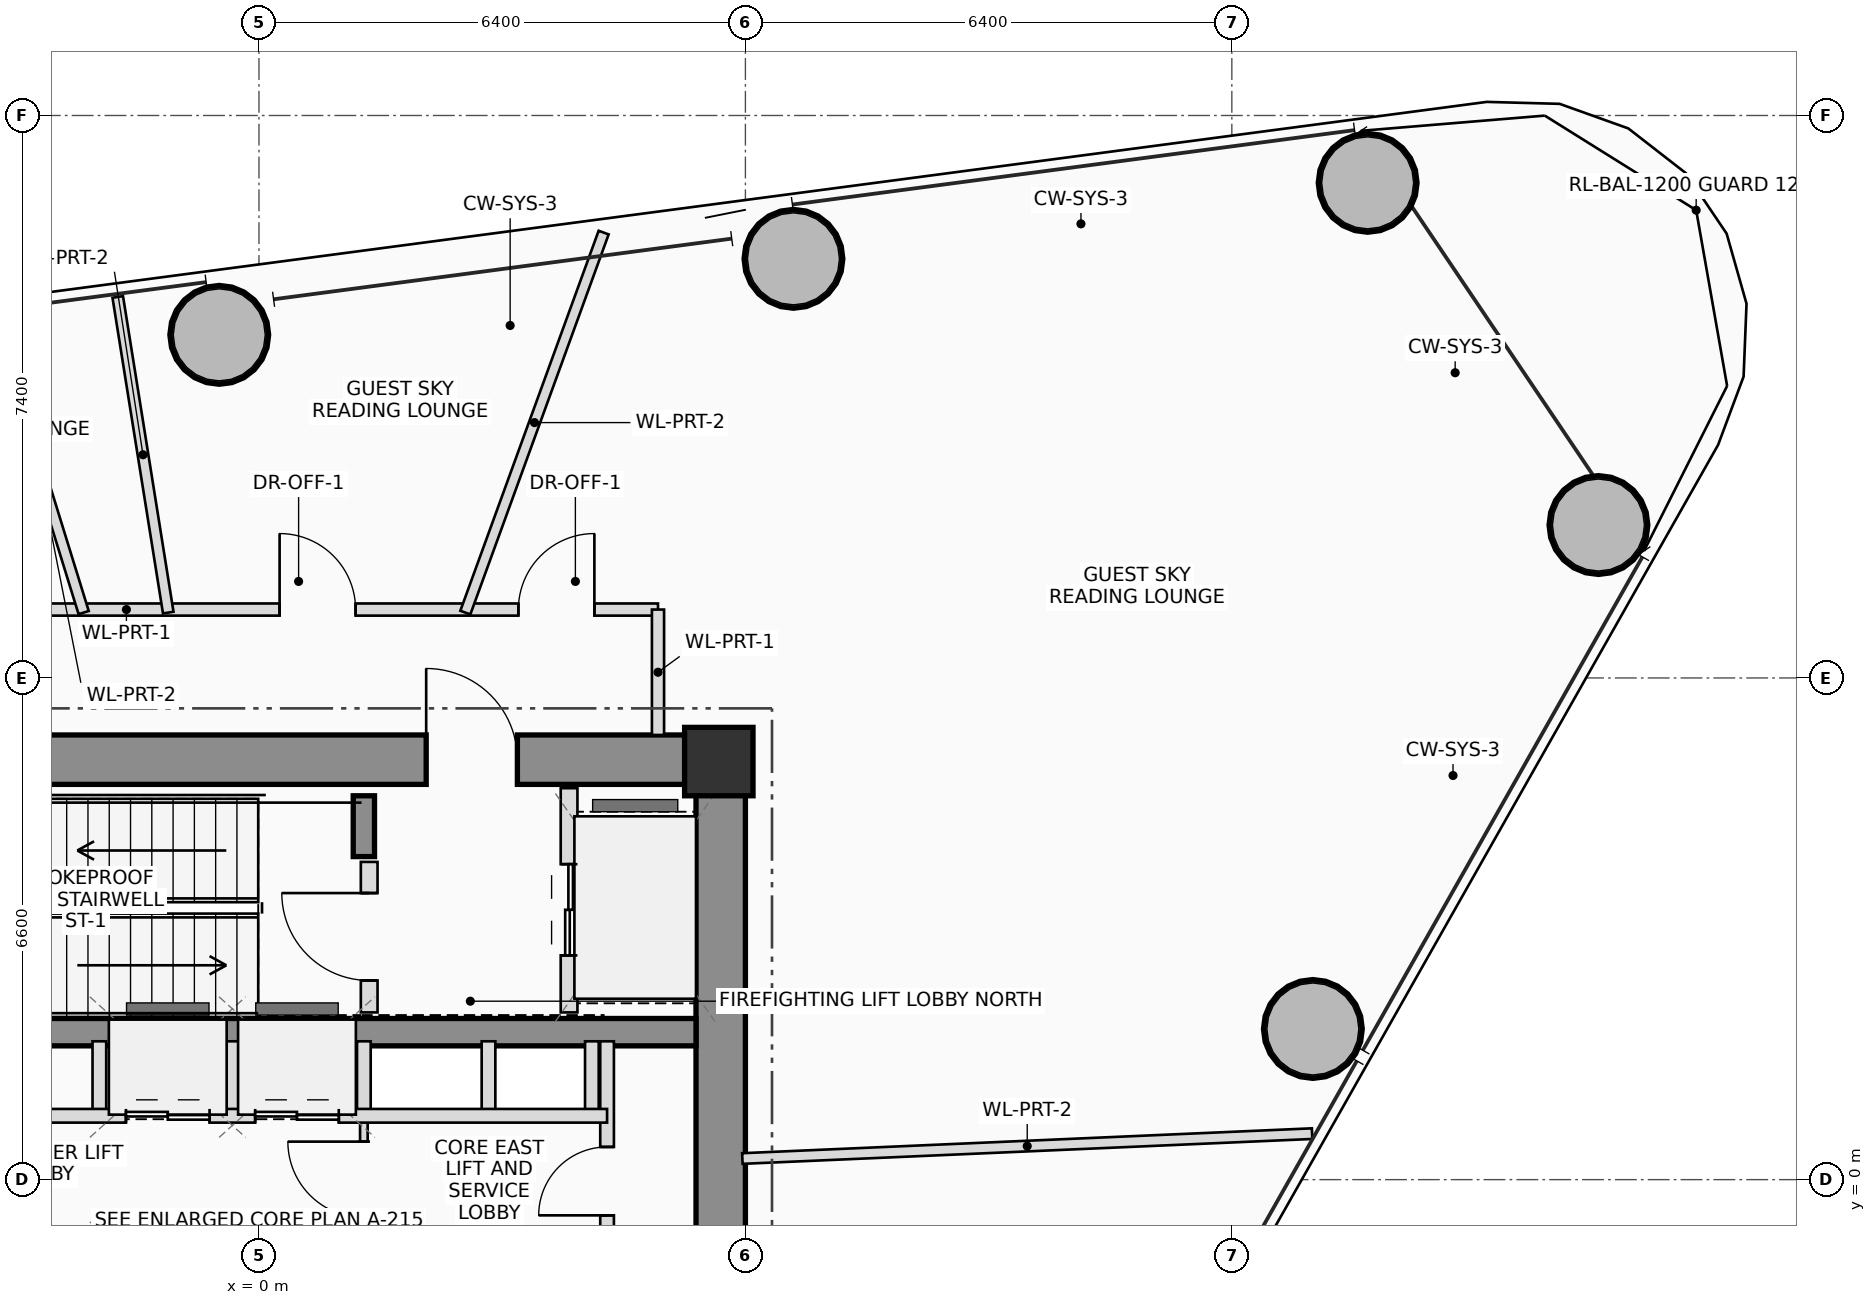
"""IFC4 building model, lengths in metres.
Left out: names, types, materials, properties, quantities, classifications, styles, units other than length and angle.
Written with IfcOpenShell. Run it as: python <this file> out.ifc"""

import sys

from ifc_helpers import new_model, si_unit, direction, frame, frame_2d, origin, origin_2d, place, context, subcontext, project, spatial, rectangle, hollow_circle, extrude, source, transform, mapped, element, fill, save


model = new_model("IFC4")
c1 = context("Model", 3, precision=1e-05, world=origin(), true_north=direction((0.0, 1.0)))
c2 = subcontext(c1, "Body", "Model", "MODEL_VIEW")
j1 = project(units=[si_unit("LENGTHUNIT", "METRE"), si_unit("PLANEANGLEUNIT", "RADIAN")], contexts=[c1])
p1 = place(None, origin())
s1 = spatial("IfcSite", under=j1, at=p1, CompositionType="ELEMENT")
p2 = place(p1, origin())
s2 = spatial("IfcBuilding", under=s1, at=p2, CompositionType="ELEMENT")
p3 = place(p2, frame((0.0, 0.0, 158.75)))
s3 = spatial("IfcBuildingStorey", under=s2, at=p3, CompositionType="ELEMENT", Elevation=158.75)
m1 = source(origin(), c2, "Body", "SweptSolid", [
    extrude(rectangle(XDim=0.9, YDim=0.9, at=origin_2d()), origin(), (0.0, 0.0, 1.0), 3.45),
])
p4 = place(p3, frame((6.05, 5.5, 0.0), z_axis=(0.0, 0.0, 1.0), x_axis=(1.0, 0.0, 0.0)))
e1 = element("IfcColumn", 1, at=p4, inside=s3, PredefinedType="COLUMN", context=c2, shape_type="MappedRepresentation", body=[
    mapped(m1, transform((0.0, 0.0, 0.0), scale=1.0)),
])
p5 = place(p3, frame((-6.4, 5.525, 0.0), z_axis=(0.0, 0.0, 1.0), x_axis=(1.0, 0.0, 0.0)))
e2 = element("IfcWall", 2, at=p5, inside=s3, PredefinedType="SHEAR", context=c2, shape_type="SweptSolid", body=[
    extrude(rectangle(XDim=12.8, YDim=0.65, at=frame_2d((6.4, 0.0))), origin(), (0.0, 0.0, 1.0), 3.45),
])
p6 = place(p5, frame((8.6, 0.0, 0.0)))
e3 = element("IfcOpeningElement", 3, at=p6, cuts=e2, PredefinedType="OPENING", context=c2, shape_type="SweptSolid", body=[
    extrude(rectangle(XDim=1.2, YDim=2.2, at=frame_2d((0.6, 1.1))), frame((0.0, 0.335, 0.0), z_axis=(0.0, -1.0, 0.0), x_axis=(1.0, 0.0, 0.0)), (0.0, 0.0, 1.0), 0.67),
])
p7 = place(p3, frame((6.075, -5.2, 0.0), z_axis=(0.0, 0.0, 1.0), x_axis=(0.0, 1.0, 0.0)))
e4 = element("IfcWall", 4, at=p7, inside=s3, PredefinedType="SHEAR", context=c2, shape_type="SweptSolid", body=[
    extrude(rectangle(XDim=10.4, YDim=0.65, at=frame_2d((5.2, 0.0))), origin(), (0.0, 0.0, 1.0), 3.45),
])
p8 = place(p3, frame((-5.75, 1.94, 0.0), z_axis=(0.0, 0.0, 1.0), x_axis=(1.0, 0.0, 0.0)))
e5 = element("IfcWall", 5, at=p8, inside=s3, PredefinedType="SHEAR", context=c2, shape_type="SweptSolid", body=[
    extrude(rectangle(XDim=11.5, YDim=0.36, at=frame_2d((5.75, 0.0))), origin(), (0.0, 0.0, 1.0), 3.45),
])
p9 = place(p3, frame((1.38, 4.25, 0.0), z_axis=(0.0, 0.0, 1.0), x_axis=(0.0, 1.0, 0.0)))
e6 = element("IfcWall", 6, at=p9, inside=s3, PredefinedType="SHEAR", context=c2, shape_type="SweptSolid", body=[
    extrude(rectangle(XDim=0.8, YDim=0.28, at=frame_2d((0.4, 0.0))), origin(), (0.0, 0.0, 1.0), 3.45),
])
m2 = source(origin(), c2, "Body", "SweptSolid", [
    extrude(hollow_circle(Radius=0.65, WallThickness=0.045, at=origin_2d()), origin(), (0.0, 0.0, 1.0), 3.45),
])
for number, where, z_axis, x_axis in (
    (7, (13.866, 1.982, 0.0), (0.0, 0.0, 1.0), (1.0, 0.0, 0.0)),
    (8, (17.624, 8.612, 0.0), (0.0, 0.0, 1.0), (1.0, 0.0, 0.0)),
    (9, (14.587, 13.114, 0.0), (0.0, 0.0, 1.0), (1.0, 0.0, 0.0)),
    (10, (7.032, 12.114, 0.0), (0.0, 0.0, 1.0), (1.0, 0.0, 0.0)),
    (11, (-0.522, 11.114, 0.0), (0.0, 0.0, 1.0), (1.0, 0.0, 0.0)),
):
    element("IfcColumn", number, at=place(p3, frame(where, z_axis=z_axis, x_axis=x_axis)), inside=s3, PredefinedType="COLUMN", context=c2, shape_type="MappedRepresentation", body=[
        mapped(m2, transform((0.0, 0.0, 0.0), scale=1.0)),
    ])
p10 = place(p3, frame((1.45, 2.2, 0.0), z_axis=(0.0, 0.0, 1.0), x_axis=(0.0, 1.0, 0.0)))
e12 = element("IfcWall", 12, at=p10, inside=s3, PredefinedType="PLUMBINGWALL", context=c2, shape_type="SweptSolid", body=[
    extrude(rectangle(XDim=1.98, YDim=0.22, at=frame_2d((0.99, 0.0))), origin(), (0.0, 0.0, 1.0), 3.25),
])
p11 = place(p10, frame((0.42, 0.0, 0.0)))
e13 = element("IfcOpeningElement", 13, at=p11, cuts=e12, PredefinedType="OPENING", context=c2, shape_type="SweptSolid", body=[
    extrude(rectangle(XDim=1.15, YDim=2.15, at=frame_2d((0.575, 1.075))), frame((0.0, 0.12, 0.0), z_axis=(0.0, -1.0, 0.0), x_axis=(1.0, 0.0, 0.0)), (0.0, 0.0, 1.0), 0.24),
])
p12 = place(p3, frame((4.08, 2.2, 0.0), z_axis=(0.0, 0.0, 1.0), x_axis=(0.0, 1.0, 0.0)))
e14 = element("IfcWall", 14, at=p12, inside=s3, PredefinedType="PLUMBINGWALL", context=c2, shape_type="SweptSolid", body=[
    extrude(rectangle(XDim=2.95, YDim=0.22, at=frame_2d((1.475, 0.0))), origin(), (0.0, 0.0, 1.0), 3.25),
])
p13 = place(p12, frame((0.75, 0.0, 0.0)))
e15 = element("IfcOpeningElement", 15, at=p13, cuts=e14, PredefinedType="OPENING", context=c2, shape_type="SweptSolid", body=[
    extrude(rectangle(XDim=1.2, YDim=2.25, at=frame_2d((0.6, 1.125))), frame((0.0, 0.12, 0.0), z_axis=(0.0, -1.0, 0.0), x_axis=(1.0, 0.0, 0.0)), (0.0, 0.0, 1.0), 0.24),
])
p14 = place(p3, frame((1.38, -0.84, 0.0), z_axis=(0.0, 0.0, 1.0), x_axis=(0.0, 1.0, 0.0)))
e16 = element("IfcWall", 16, at=p14, inside=s3, PredefinedType="PARTITIONING", context=c2, shape_type="SweptSolid", body=[
    extrude(rectangle(XDim=1.68, YDim=0.1, at=frame_2d((0.84, 0.0))), origin(), (0.0, 0.0, 1.0), 3.25),
])
p15 = place(p14, frame((0.34, 0.0, 0.0)))
e17 = element("IfcOpeningElement", 17, at=p15, cuts=e16, PredefinedType="OPENING", context=c2, shape_type="SweptSolid", body=[
    extrude(rectangle(XDim=1.0, YDim=2.25, at=frame_2d((0.5, 1.125))), frame((0.0, 0.06, 0.0), z_axis=(0.0, -1.0, 0.0), x_axis=(1.0, 0.0, 0.0)), (0.0, 0.0, 1.0), 0.12),
])
for number, where, z_axis, x_axis in (
    (18, (-2.1, 0.84, 0.0), (0.0, 0.0, 1.0), (0.0, 1.0, 0.0)),
    (19, (-0.35, 0.84, 0.0), (0.0, 0.0, 1.0), (0.0, 1.0, 0.0)),
    (20, (1.38, 0.84, 0.0), (0.0, 0.0, 1.0), (0.0, 1.0, 0.0)),
    (21, (3.02, 0.84, 0.0), (0.0, 0.0, 1.0), (0.0, 1.0, 0.0)),
    (22, (4.38, 0.84, 0.0), (0.0, 0.0, 1.0), (0.0, 1.0, 0.0)),
):
    element("IfcWall", number, at=place(p3, frame(where, z_axis=z_axis, x_axis=x_axis)), inside=s3, PredefinedType="PLUMBINGWALL", context=c2, shape_type="SweptSolid", body=[
        extrude(rectangle(XDim=0.98, YDim=0.18, at=frame_2d((0.49, 0.0))), origin(), (0.0, 0.0, 1.0), 3.25),
    ])
p16 = place(p3, frame((4.58, -1.82, 0.0), z_axis=(0.0, 0.0, 1.0), x_axis=(0.0, 1.0, 0.0)))
e23 = element("IfcWall", 23, at=p16, inside=s3, PredefinedType="PLUMBINGWALL", context=c2, shape_type="SweptSolid", body=[
    extrude(rectangle(XDim=3.64, YDim=0.18, at=frame_2d((1.82, 0.0))), origin(), (0.0, 0.0, 1.0), 3.25),
])
p17 = place(p16, frame((1.35, 0.0, 0.0)))
e24 = element("IfcOpeningElement", 24, at=p17, cuts=e23, PredefinedType="OPENING", context=c2, shape_type="SweptSolid", body=[
    extrude(rectangle(XDim=0.9, YDim=2.05, at=frame_2d((0.45, 1.025))), frame((0.0, 0.1, 0.0), z_axis=(0.0, -1.0, 0.0), x_axis=(1.0, 0.0, 0.0)), (0.0, 0.0, 1.0), 0.2),
])
p18 = place(p3, frame((-5.68, 0.84, 0.0), z_axis=(0.0, 0.0, 1.0), x_axis=(1.0, 0.0, 0.0)))
e25 = element("IfcWall", 25, at=p18, inside=s3, PredefinedType="PLUMBINGWALL", context=c2, shape_type="SweptSolid", body=[
    extrude(rectangle(XDim=10.26, YDim=0.18, at=frame_2d((5.13, 0.0))), origin(), (0.0, 0.0, 1.0), 3.25),
])
p19 = place(p18, frame((1.08, 0.0, 0.0)))
e26 = element("IfcOpeningElement", 26, at=p19, cuts=e25, PredefinedType="OPENING", context=c2, shape_type="SweptSolid", body=[
    extrude(rectangle(XDim=0.9, YDim=2.05, at=frame_2d((0.45, 1.025))), frame((0.0, 0.1, 0.0), z_axis=(0.0, -1.0, 0.0), x_axis=(1.0, 0.0, 0.0)), (0.0, 0.0, 1.0), 0.2),
])
p20 = place(p18, frame((3.93, 0.0, 0.0)))
e27 = element("IfcOpeningElement", 27, at=p20, cuts=e25, PredefinedType="OPENING", context=c2, shape_type="SweptSolid", body=[
    extrude(rectangle(XDim=1.1, YDim=2.2, at=frame_2d((0.55, 1.1))), frame((0.0, 0.1, 0.0), z_axis=(0.0, -1.0, 0.0), x_axis=(1.0, 0.0, 0.0)), (0.0, 0.0, 1.0), 0.2),
])
p21 = place(p18, frame((5.63, 0.0, 0.0)))
e28 = element("IfcOpeningElement", 28, at=p21, cuts=e25, PredefinedType="OPENING", context=c2, shape_type="SweptSolid", body=[
    extrude(rectangle(XDim=1.1, YDim=2.2, at=frame_2d((0.55, 1.1))), frame((0.0, 0.1, 0.0), z_axis=(0.0, -1.0, 0.0), x_axis=(1.0, 0.0, 0.0)), (0.0, 0.0, 1.0), 0.2),
])
p22 = place(p3, frame((-6.36, 7.5, 0.0), z_axis=(0.0, 0.0, 1.0), x_axis=(1.0, 0.0, 0.0)))
e29 = element("IfcWall", 29, at=p22, inside=s3, PredefinedType="PARTITIONING", context=c2, shape_type="SweptSolid", body=[
    extrude(rectangle(XDim=11.61, YDim=0.16, at=frame_2d((5.805, 0.0))), origin(), (0.0, 0.0, 1.0), 2.605),
])
p23 = place(p22, frame((1.6, 0.0, 0.0)))
e30 = element("IfcOpeningElement", 30, at=p23, cuts=e29, PredefinedType="OPENING", context=c2, shape_type="SweptSolid", body=[
    extrude(rectangle(XDim=1.0, YDim=2.25, at=frame_2d((0.5, 1.125))), frame((0.0, 0.09, 0.0), z_axis=(0.0, -1.0, 0.0), x_axis=(1.0, 0.0, 0.0)), (0.0, 0.0, 1.0), 0.18),
])
p24 = place(p22, frame((6.631, 0.0, 0.0)))
e31 = element("IfcOpeningElement", 31, at=p24, cuts=e29, PredefinedType="OPENING", context=c2, shape_type="SweptSolid", body=[
    extrude(rectangle(XDim=1.0, YDim=2.25, at=frame_2d((0.5, 1.125))), frame((0.0, 0.09, 0.0), z_axis=(0.0, -1.0, 0.0), x_axis=(1.0, 0.0, 0.0)), (0.0, 0.0, 1.0), 0.18),
])
p25 = place(p22, frame((9.773, 0.0, 0.0)))
e32 = element("IfcOpeningElement", 32, at=p25, cuts=e29, PredefinedType="OPENING", context=c2, shape_type="SweptSolid", body=[
    extrude(rectangle(XDim=1.0, YDim=2.25, at=frame_2d((0.5, 1.125))), frame((0.0, 0.09, 0.0), z_axis=(0.0, -1.0, 0.0), x_axis=(1.0, 0.0, 0.0)), (0.0, 0.0, 1.0), 0.18),
])
p26 = place(p3, frame((5.25, 7.5, 0.0), z_axis=(0.0, 0.0, 1.0), x_axis=(0.0, -1.0, 0.0)))
e33 = element("IfcWall", 33, at=p26, inside=s3, PredefinedType="PARTITIONING", context=c2, shape_type="SweptSolid", body=[
    extrude(rectangle(XDim=1.65, YDim=0.16, at=frame_2d((0.825, 0.0))), origin(), (0.0, 0.0, 1.0), 3.25),
])
p27 = place(p3, frame((6.36, 0.278, 0.0), z_axis=(0.0, 0.0, 1.0), x_axis=(0.999047543566, 0.043634913719, 0.0)))
e34 = element("IfcWall", 34, at=p27, inside=s3, PredefinedType="PARTITIONING", context=c2, shape_type="SweptSolid", body=[
    extrude(rectangle(XDim=7.503, YDim=0.14, at=frame_2d((3.751, 0.0))), origin(), (0.0, 0.0, 1.0), 2.605),
])
p28 = place(p3, frame((2.715, 7.46, 0.0), z_axis=(0.0, 0.0, 1.0), x_axis=(0.342045165819, 0.939683512966, 0.0)))
e35 = element("IfcWall", 35, at=p28, inside=s3, PredefinedType="PARTITIONING", context=c2, shape_type="SweptSolid", body=[
    extrude(rectangle(XDim=5.32, YDim=0.14, at=frame_2d((2.66, 0.0))), origin(), (0.0, 0.0, 1.0), 2.605),
])
p29 = place(p3, frame((-1.194, 7.46, 0.0), z_axis=(0.0, 0.0, 1.0), x_axis=(-0.157995028697, 0.987439907492, 0.0)))
e36 = element("IfcWall", 36, at=p29, inside=s3, PredefinedType="PARTITIONING", context=c2, shape_type="SweptSolid", body=[
    extrude(rectangle(XDim=4.206, YDim=0.14, at=frame_2d((2.103, 0.0))), origin(), (0.0, 0.0, 1.0), 2.605),
])
p30 = place(p3, frame((-2.307, 7.46, 0.0), z_axis=(0.0, 0.0, 1.0), x_axis=(-0.295406664686, 0.955371604382, 0.0)))
e37 = element("IfcWall", 37, at=p30, inside=s3, PredefinedType="PARTITIONING", context=c2, shape_type="SweptSolid", body=[
    extrude(rectangle(XDim=4.117, YDim=0.14, at=frame_2d((2.058, 0.0))), origin(), (0.0, 0.0, 1.0), 2.605),
])
p31 = place(p6, origin())
e38 = element("IfcDoor", 38, at=p31, inside=s3, OperationType="SINGLE_SWING_LEFT", PredefinedType="DOOR", context=c2, shape_type="SweptSolid", body=[
    extrude(rectangle(XDim=1.2, YDim=2.2, at=frame_2d((0.6, 1.1))), frame((0.0, 0.025, 0.0), z_axis=(0.0, -1.0, 0.0), x_axis=(1.0, 0.0, 0.0)), (0.0, 0.0, 1.0), 0.05),
])
fill(e3, e38)
p32 = place(p11, origin())
e39 = element("IfcDoor", 39, at=p32, inside=s3, OperationType="SINGLE_SWING_RIGHT", PredefinedType="DOOR", context=c2, shape_type="SweptSolid", body=[
    extrude(rectangle(XDim=1.15, YDim=2.15, at=frame_2d((0.575, 1.075))), frame((0.0, 0.025, 0.0), z_axis=(0.0, -1.0, 0.0), x_axis=(1.0, 0.0, 0.0)), (0.0, 0.0, 1.0), 0.05),
])
fill(e13, e39)
p33 = place(p13, origin())
e40 = element("IfcDoor", 40, at=p33, inside=s3, OperationType="DOUBLE_DOOR_SLIDING", PredefinedType="DOOR", context=c2, shape_type="SweptSolid", body=[
    extrude(rectangle(XDim=1.2, YDim=2.25, at=frame_2d((0.6, 1.125))), frame((0.0, 0.025, 0.0), z_axis=(0.0, -1.0, 0.0), x_axis=(1.0, 0.0, 0.0)), (0.0, 0.0, 1.0), 0.05),
])
fill(e15, e40)
p34 = place(p15, origin())
e41 = element("IfcDoor", 41, at=p34, inside=s3, OperationType="SINGLE_SWING_RIGHT", PredefinedType="DOOR", context=c2, shape_type="SweptSolid", body=[
    extrude(rectangle(XDim=1.0, YDim=2.25, at=frame_2d((0.5, 1.125))), frame((0.0, 0.025, 0.0), z_axis=(0.0, -1.0, 0.0), x_axis=(1.0, 0.0, 0.0)), (0.0, 0.0, 1.0), 0.05),
])
fill(e17, e41)
p35 = place(p17, origin())
e42 = element("IfcDoor", 42, at=p35, inside=s3, OperationType="SINGLE_SWING_LEFT", PredefinedType="DOOR", context=c2, shape_type="SweptSolid", body=[
    extrude(rectangle(XDim=0.9, YDim=2.05, at=frame_2d((0.45, 1.025))), frame((0.0, 0.025, 0.0), z_axis=(0.0, -1.0, 0.0), x_axis=(1.0, 0.0, 0.0)), (0.0, 0.0, 1.0), 0.05),
])
fill(e24, e42)
p36 = place(p20, origin())
e43 = element("IfcDoor", 43, at=p36, inside=s3, OperationType="DOUBLE_DOOR_SLIDING", PredefinedType="DOOR", context=c2, shape_type="SweptSolid", body=[
    extrude(rectangle(XDim=1.1, YDim=2.2, at=frame_2d((0.55, 1.1))), frame((0.0, 0.025, 0.0), z_axis=(0.0, -1.0, 0.0), x_axis=(1.0, 0.0, 0.0)), (0.0, 0.0, 1.0), 0.05),
])
fill(e27, e43)
p37 = place(p21, origin())
e44 = element("IfcDoor", 44, at=p37, inside=s3, OperationType="DOUBLE_DOOR_SLIDING", PredefinedType="DOOR", context=c2, shape_type="SweptSolid", body=[
    extrude(rectangle(XDim=1.1, YDim=2.2, at=frame_2d((0.55, 1.1))), frame((0.0, 0.025, 0.0), z_axis=(0.0, -1.0, 0.0), x_axis=(1.0, 0.0, 0.0)), (0.0, 0.0, 1.0), 0.05),
])
fill(e28, e44)
p38 = place(p24, origin())
e45 = element("IfcDoor", 45, at=p38, inside=s3, OperationType="SINGLE_SWING_LEFT", PredefinedType="DOOR", context=c2, shape_type="SweptSolid", body=[
    extrude(rectangle(XDim=1.0, YDim=2.25, at=frame_2d((0.5, 1.125))), frame((0.0, 0.025, 0.0), z_axis=(0.0, -1.0, 0.0), x_axis=(1.0, 0.0, 0.0)), (0.0, 0.0, 1.0), 0.05),
])
fill(e31, e45)
p39 = place(p25, origin())
e46 = element("IfcDoor", 46, at=p39, inside=s3, OperationType="SINGLE_SWING_RIGHT", PredefinedType="DOOR", context=c2, shape_type="SweptSolid", body=[
    extrude(rectangle(XDim=1.0, YDim=2.25, at=frame_2d((0.5, 1.125))), frame((0.0, 0.025, 0.0), z_axis=(0.0, -1.0, 0.0), x_axis=(1.0, 0.0, 0.0)), (0.0, 0.0, 1.0), 0.05),
])
fill(e32, e46)
save(model, sys.argv[1])
